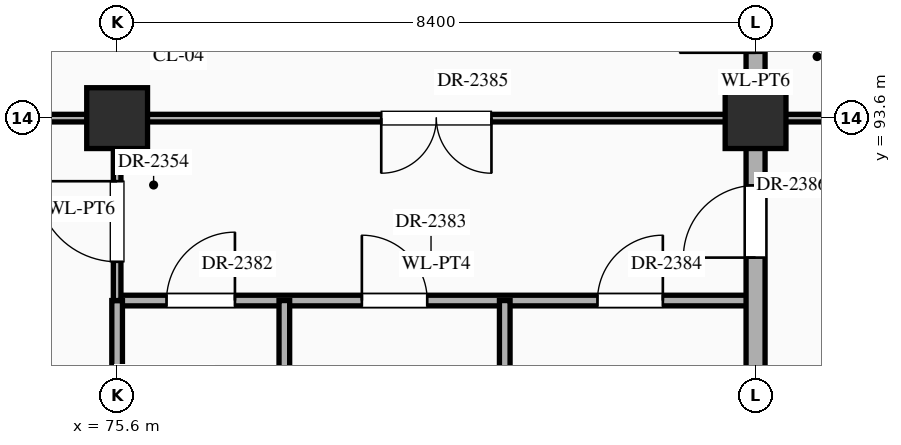
"""IFC4 building model, lengths in metres.
Left out: names, types, materials, properties, quantities, classifications, styles, units other than length and angle.
Written with IfcOpenShell. Run it as: python <this file> out.ifc"""

import sys

from ifc_helpers import new_model, si_unit, direction, frame, frame_2d, origin, origin_2d, place, context, subcontext, project, spatial, rectangle, extrude, element, fill, save


model = new_model("IFC4")
c1 = context("Model", 3, precision=1e-05, world=origin(), true_north=direction((0.0, 1.0)))
c2 = subcontext(c1, "Body", "Model", "MODEL_VIEW")
j1 = project(units=[si_unit("LENGTHUNIT", "METRE"), si_unit("PLANEANGLEUNIT", "RADIAN")], contexts=[c1])
p1 = place(None, origin())
s1 = spatial("IfcSite", under=j1, at=p1, CompositionType="ELEMENT")
p2 = place(p1, origin())
s2 = spatial("IfcBuilding", under=s1, at=p2, CompositionType="ELEMENT")
p3 = place(p2, frame((0.0, 0.0, 30.6)))
s3 = spatial("IfcBuildingStorey", under=s2, at=p3, CompositionType="ELEMENT", Elevation=30.6)
for number, where, z_axis, x_axis in (
    (1, (75.6, 93.6, 0.0), (0.0, 0.0, 1.0), (1.0, 0.0, 0.0)),
    (2, (84.0, 93.6, 0.0), (0.0, 0.0, 1.0), (1.0, 0.0, 0.0)),
):
    element("IfcColumn", number, at=place(p3, frame(where, z_axis=z_axis, x_axis=x_axis)), inside=s3, PredefinedType="COLUMN", context=c2, shape_type="SweptSolid", body=[
        extrude(rectangle(XDim=0.8, YDim=0.8, at=origin_2d()), origin(), (0.0, 0.0, 1.0), 4.5),
    ])
p4 = place(p3, frame((75.6, 91.2, 0.0), z_axis=(0.0, 0.0, 1.0), x_axis=(1.0, 0.0, 0.0)))
e3 = element("IfcWall", 3, at=p4, inside=s3, PredefinedType="STANDARD", context=c2, shape_type="SweptSolid", body=[
    extrude(rectangle(XDim=8.4, YDim=0.14, at=frame_2d((4.2, 0.0))), origin(), (0.0, 0.0, 1.0), 4.24),
])
p5 = place(p4, frame((0.65, 0.0, 0.0)))
e4 = element("IfcOpeningElement", 4, at=p5, cuts=e3, PredefinedType="OPENING", context=c2, shape_type="SweptSolid", body=[
    extrude(rectangle(XDim=0.9, YDim=2.15, at=frame_2d((0.45, 1.075))), frame((0.0, 0.082, 0.0), z_axis=(0.0, -1.0, 0.0), x_axis=(1.0, 0.0, 0.0)), (0.0, 0.0, 1.0), 0.164),
])
p6 = place(p4, frame((3.22, 0.0, 0.0)))
e5 = element("IfcOpeningElement", 5, at=p6, cuts=e3, PredefinedType="OPENING", context=c2, shape_type="SweptSolid", body=[
    extrude(rectangle(XDim=0.86, YDim=2.1, at=frame_2d((0.43, 1.05))), frame((0.0, 0.082, 0.0), z_axis=(0.0, -1.0, 0.0), x_axis=(1.0, 0.0, 0.0)), (0.0, 0.0, 1.0), 0.164),
])
p7 = place(p4, frame((6.32, 0.0, 0.0)))
e6 = element("IfcOpeningElement", 6, at=p7, cuts=e3, PredefinedType="OPENING", context=c2, shape_type="SweptSolid", body=[
    extrude(rectangle(XDim=0.86, YDim=2.1, at=frame_2d((0.43, 1.05))), frame((0.0, 0.082, 0.0), z_axis=(0.0, -1.0, 0.0), x_axis=(1.0, 0.0, 0.0)), (0.0, 0.0, 1.0), 0.164),
])
p8 = place(p3, frame((67.2, 93.6, 0.0), z_axis=(0.0, 0.0, 1.0), x_axis=(1.0, 0.0, 0.0)))
e7 = element("IfcWall", 7, at=p8, inside=s3, PredefinedType="STANDARD", context=c2, shape_type="SweptSolid", body=[
    extrude(rectangle(XDim=33.6, YDim=0.1, at=frame_2d((16.8, 0.0))), origin(), (0.0, 0.0, 1.0), 3.39),
])
p9 = place(p8, frame((3.475, 0.0, 0.0)))
e8 = element("IfcOpeningElement", 8, at=p9, cuts=e7, PredefinedType="OPENING", context=c2, shape_type="SweptSolid", body=[
    extrude(rectangle(XDim=1.45, YDim=2.3, at=frame_2d((0.725, 1.15))), frame((0.0, 0.062, 0.0), z_axis=(0.0, -1.0, 0.0), x_axis=(1.0, 0.0, 0.0)), (0.0, 0.0, 1.0), 0.124),
])
p10 = place(p8, frame((28.45, 0.0, 0.0)))
e9 = element("IfcOpeningElement", 9, at=p10, cuts=e7, PredefinedType="OPENING", context=c2, shape_type="SweptSolid", body=[
    extrude(rectangle(XDim=1.9, YDim=2.5, at=frame_2d((0.95, 1.25))), frame((0.0, 0.062, 0.0), z_axis=(0.0, -1.0, 0.0), x_axis=(1.0, 0.0, 0.0)), (0.0, 0.0, 1.0), 0.124),
])
p11 = place(p8, frame((11.875, 0.0, 0.0)))
e10 = element("IfcOpeningElement", 10, at=p11, cuts=e7, PredefinedType="OPENING", context=c2, shape_type="SweptSolid", body=[
    extrude(rectangle(XDim=1.45, YDim=2.3, at=frame_2d((0.725, 1.15))), frame((0.0, 0.062, 0.0), z_axis=(0.0, -1.0, 0.0), x_axis=(1.0, 0.0, 0.0)), (0.0, 0.0, 1.0), 0.124),
])
p12 = place(p8, frame((17.76, 0.0, 0.0)))
e11 = element("IfcOpeningElement", 11, at=p12, cuts=e7, PredefinedType="OPENING", context=c2, shape_type="SweptSolid", body=[
    extrude(rectangle(XDim=1.2, YDim=2.35, at=frame_2d((0.6, 1.175))), frame((0.0, 0.062, 0.0), z_axis=(0.0, -1.0, 0.0), x_axis=(1.0, 0.0, 0.0)), (0.0, 0.0, 1.0), 0.124),
])
p13 = place(p8, frame((20.38, 0.0, 0.0)))
e12 = element("IfcOpeningElement", 12, at=p13, cuts=e7, PredefinedType="OPENING", context=c2, shape_type="SweptSolid", body=[
    extrude(rectangle(XDim=1.24, YDim=2.3, at=frame_2d((0.62, 1.15))), frame((0.0, 0.062, 0.0), z_axis=(0.0, -1.0, 0.0), x_axis=(1.0, 0.0, 0.0)), (0.0, 0.0, 1.0), 0.124),
])
p14 = place(p8, frame((23.0, 0.0, 0.0)))
e13 = element("IfcOpeningElement", 13, at=p14, cuts=e7, PredefinedType="OPENING", context=c2, shape_type="SweptSolid", body=[
    extrude(rectangle(XDim=1.28, YDim=2.35, at=frame_2d((0.64, 1.175))), frame((0.0, 0.062, 0.0), z_axis=(0.0, -1.0, 0.0), x_axis=(1.0, 0.0, 0.0)), (0.0, 0.0, 1.0), 0.124),
])
p15 = place(p3, frame((75.6, 89.2, 0.0), z_axis=(0.0, 0.0, 1.0), x_axis=(0.0, 1.0, 0.0)))
e14 = element("IfcWall", 14, at=p15, inside=s3, PredefinedType="STANDARD", context=c2, shape_type="SweptSolid", body=[
    extrude(rectangle(XDim=2.0, YDim=0.14, at=frame_2d((1.0, 0.0))), origin(), (0.0, 0.0, 1.0), 3.49),
])
p16 = place(p3, frame((75.6, 91.2, 0.0), z_axis=(0.0, 0.0, 1.0), x_axis=(0.0, 1.0, 0.0)))
e15 = element("IfcWall", 15, at=p16, inside=s3, PredefinedType="STANDARD", context=c2, shape_type="SweptSolid", body=[
    extrude(rectangle(XDim=2.4, YDim=0.1, at=frame_2d((1.2, 0.0))), origin(), (0.0, 0.0, 1.0), 3.49),
])
p17 = place(p16, frame((0.51, 0.0, 0.0)))
e16 = element("IfcOpeningElement", 16, at=p17, cuts=e15, PredefinedType="OPENING", context=c2, shape_type="SweptSolid", body=[
    extrude(rectangle(XDim=1.06, YDim=2.4, at=frame_2d((0.53, 1.2))), frame((0.0, 0.062, 0.0), z_axis=(0.0, -1.0, 0.0), x_axis=(1.0, 0.0, 0.0)), (0.0, 0.0, 1.0), 0.124),
])
for number, where, z_axis, x_axis in (
    (17, (77.8, 86.4, 0.0), (0.0, 0.0, 1.0), (0.0, 1.0, 0.0)),
    (18, (80.7, 86.4, 0.0), (0.0, 0.0, 1.0), (0.0, 1.0, 0.0)),
):
    element("IfcWall", number, at=place(p3, frame(where, z_axis=z_axis, x_axis=x_axis)), inside=s3, PredefinedType="STANDARD", context=c2, shape_type="SweptSolid", body=[
        extrude(rectangle(XDim=4.8, YDim=0.14, at=frame_2d((2.4, 0.0))), origin(), (0.0, 0.0, 1.0), 4.24),
    ])
p18 = place(p3, frame((84.0, 79.24, 0.0), z_axis=(0.0, 0.0, 1.0), x_axis=(0.0, 1.0, 0.0)))
e19 = element("IfcWall", 19, at=p18, inside=s3, PredefinedType="STANDARD", context=c2, shape_type="SweptSolid", body=[
    extrude(rectangle(XDim=35.92, YDim=0.25, at=frame_2d((17.96, 0.0))), origin(), (0.0, 0.0, 1.0), 3.49),
])
p19 = place(p18, frame((22.77, 0.0, 0.0)))
e20 = element("IfcOpeningElement", 20, at=p19, cuts=e19, PredefinedType="OPENING", context=c2, shape_type="SweptSolid", body=[
    extrude(rectangle(XDim=1.5, YDim=2.25, at=frame_2d((0.75, 1.125))), frame((0.0, 0.137, 0.0), z_axis=(0.0, -1.0, 0.0), x_axis=(1.0, 0.0, 0.0)), (0.0, 0.0, 1.0), 0.274),
])
p20 = place(p18, frame((12.525, 0.0, 0.0)))
e21 = element("IfcOpeningElement", 21, at=p20, cuts=e19, PredefinedType="OPENING", context=c2, shape_type="SweptSolid", body=[
    extrude(rectangle(XDim=0.95, YDim=2.15, at=frame_2d((0.475, 1.075))), frame((0.0, 0.137, 0.0), z_axis=(0.0, -1.0, 0.0), x_axis=(1.0, 0.0, 0.0)), (0.0, 0.0, 1.0), 0.274),
])
p21 = place(p18, frame((15.22, 0.0, 0.0)))
e22 = element("IfcOpeningElement", 22, at=p21, cuts=e19, PredefinedType="OPENING", context=c2, shape_type="SweptSolid", body=[
    extrude(rectangle(XDim=1.0, YDim=2.2, at=frame_2d((0.5, 1.1))), frame((0.0, 0.137, 0.0), z_axis=(0.0, -1.0, 0.0), x_axis=(1.0, 0.0, 0.0)), (0.0, 0.0, 1.0), 0.274),
])
p22 = place(p18, frame((25.8, 0.0, 0.0)))
e23 = element("IfcOpeningElement", 23, at=p22, cuts=e19, PredefinedType="OPENING", context=c2, shape_type="SweptSolid", body=[
    extrude(rectangle(XDim=2.0, YDim=2.4, at=frame_2d((1.0, 1.2))), frame((0.0, 0.137, 0.0), z_axis=(0.0, -1.0, 0.0), x_axis=(1.0, 0.0, 0.0)), (0.0, 0.0, 1.0), 0.274),
])
p23 = place(p18, frame((29.57, 0.0, 0.0)))
e24 = element("IfcOpeningElement", 24, at=p23, cuts=e19, PredefinedType="OPENING", context=c2, shape_type="SweptSolid", body=[
    extrude(rectangle(XDim=1.1, YDim=2.2, at=frame_2d((0.55, 1.1))), frame((0.0, 0.137, 0.0), z_axis=(0.0, -1.0, 0.0), x_axis=(1.0, 0.0, 0.0)), (0.0, 0.0, 1.0), 0.274),
])
p24 = place(p18, frame((5.25, 0.0, 0.0)))
e25 = element("IfcOpeningElement", 25, at=p24, cuts=e19, PredefinedType="OPENING", context=c2, shape_type="SweptSolid", body=[
    extrude(rectangle(XDim=1.1, YDim=2.2, at=frame_2d((0.55, 1.1))), frame((0.0, 0.137, 0.0), z_axis=(0.0, -1.0, 0.0), x_axis=(1.0, 0.0, 0.0)), (0.0, 0.0, 1.0), 0.274),
])
p25 = place(p17, origin())
e26 = element("IfcDoor", 26, at=p25, inside=s3, OperationType="SINGLE_SWING_RIGHT", PredefinedType="DOOR", context=c2, shape_type="SweptSolid", body=[
    extrude(rectangle(XDim=1.06, YDim=2.4, at=frame_2d((0.53, 1.2))), frame((0.0, 0.025, 0.0), z_axis=(0.0, -1.0, 0.0), x_axis=(1.0, 0.0, 0.0)), (0.0, 0.0, 1.0), 0.05),
])
fill(e16, e26)
p26 = place(p5, origin())
e27 = element("IfcDoor", 27, at=p26, inside=s3, OperationType="SINGLE_SWING_RIGHT", PredefinedType="DOOR", context=c2, shape_type="SweptSolid", body=[
    extrude(rectangle(XDim=0.9, YDim=2.15, at=frame_2d((0.45, 1.075))), frame((0.0, 0.025, 0.0), z_axis=(0.0, -1.0, 0.0), x_axis=(1.0, 0.0, 0.0)), (0.0, 0.0, 1.0), 0.05),
])
fill(e4, e27)
p27 = place(p6, origin())
e28 = element("IfcDoor", 28, at=p27, inside=s3, OperationType="SINGLE_SWING_LEFT", PredefinedType="DOOR", context=c2, shape_type="SweptSolid", body=[
    extrude(rectangle(XDim=0.86, YDim=2.1, at=frame_2d((0.43, 1.05))), frame((0.0, 0.025, 0.0), z_axis=(0.0, -1.0, 0.0), x_axis=(1.0, 0.0, 0.0)), (0.0, 0.0, 1.0), 0.05),
])
fill(e5, e28)
p28 = place(p7, origin())
e29 = element("IfcDoor", 29, at=p28, inside=s3, OperationType="SINGLE_SWING_RIGHT", PredefinedType="DOOR", context=c2, shape_type="SweptSolid", body=[
    extrude(rectangle(XDim=0.86, YDim=2.1, at=frame_2d((0.43, 1.05))), frame((0.0, 0.025, 0.0), z_axis=(0.0, -1.0, 0.0), x_axis=(1.0, 0.0, 0.0)), (0.0, 0.0, 1.0), 0.05),
])
fill(e6, e29)
p29 = place(p11, frame((1.45, 0.0, 0.0), z_axis=(0.0, 0.0, 1.0), x_axis=(-1.0, 0.0, 0.0)))
e30 = element("IfcDoor", 30, at=p29, inside=s3, OperationType="DOUBLE_DOOR_SINGLE_SWING", PredefinedType="DOOR", context=c2, shape_type="SweptSolid", body=[
    extrude(rectangle(XDim=1.45, YDim=2.3, at=frame_2d((0.725, 1.15))), frame((0.0, 0.025, 0.0), z_axis=(0.0, -1.0, 0.0), x_axis=(1.0, 0.0, 0.0)), (0.0, 0.0, 1.0), 0.05),
])
fill(e10, e30)
p30 = place(p20, origin())
e31 = element("IfcDoor", 31, at=p30, inside=s3, OperationType="SINGLE_SWING_LEFT", PredefinedType="DOOR", context=c2, shape_type="SweptSolid", body=[
    extrude(rectangle(XDim=0.95, YDim=2.15, at=frame_2d((0.475, 1.075))), frame((0.0, 0.025, 0.0), z_axis=(0.0, -1.0, 0.0), x_axis=(1.0, 0.0, 0.0)), (0.0, 0.0, 1.0), 0.05),
])
fill(e21, e31)
save(model, sys.argv[1])
